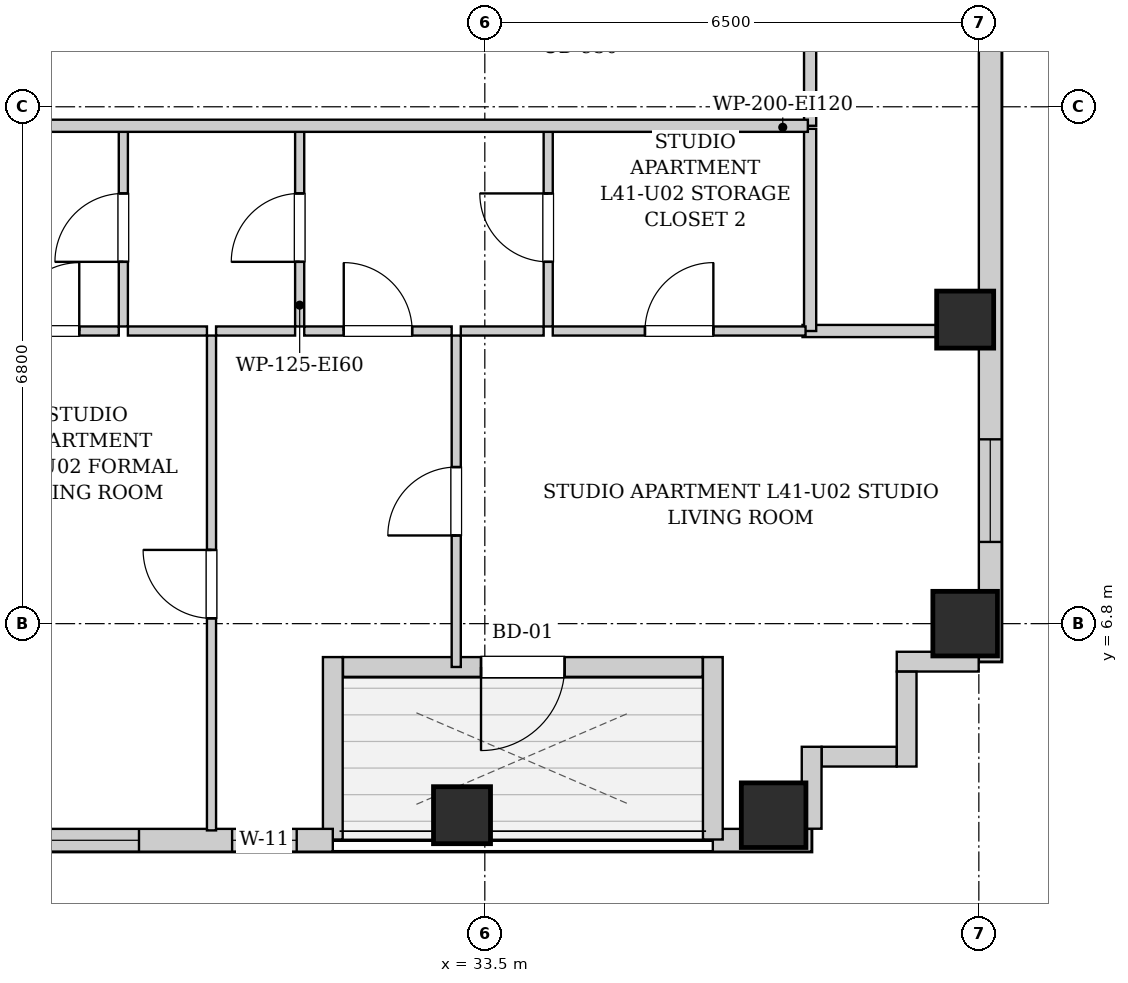
"""IFC4 building model, lengths in metres.
Left out: names, types, materials, properties, quantities, classifications, styles, units other than length and angle.
Written with IfcOpenShell. Run it as: python <this file> out.ifc"""

import sys

from ifc_helpers import new_model, si_unit, direction, frame, frame_2d, origin, origin_2d, place, context, subcontext, project, spatial, rectangle, extrude, element, fill, save


model = new_model("IFC4")
c1 = context("Model", 3, precision=1e-05, world=origin(), true_north=direction((0.0, 1.0)))
c2 = subcontext(c1, "Body", "Model", "MODEL_VIEW")
j1 = project(units=[si_unit("LENGTHUNIT", "METRE"), si_unit("PLANEANGLEUNIT", "RADIAN")], contexts=[c1])
p1 = place(None, origin())
s1 = spatial("IfcSite", under=j1, at=p1, CompositionType="ELEMENT")
p2 = place(p1, origin())
s2 = spatial("IfcBuilding", under=s1, at=p2, CompositionType="ELEMENT")
p3 = place(p2, frame((0.0, 0.0, 143.9)))
s3 = spatial("IfcBuildingStorey", under=s2, at=p3, CompositionType="ELEMENT", Elevation=143.9)
p4 = place(p3, frame((33.2, 4.28, 0.0), z_axis=(0.0, 0.0, 1.0), x_axis=(1.0, 0.0, 0.0)))
e1 = element("IfcColumn", 1, at=p4, inside=s3, PredefinedType="COLUMN", context=c2, shape_type="SweptSolid", body=[
    extrude(rectangle(XDim=0.75, YDim=0.75, at=origin_2d()), origin(), (0.0, 0.0, 1.0), 3.25),
])
for number, where, z_axis, x_axis in (
    (2, (37.3, 4.28, 0.0), (0.0, 0.0, 1.0), (1.0, 0.0, 0.0)),
    (3, (39.82, 6.8, 0.0), (0.0, 0.0, 1.0), (1.0, 0.0, 0.0)),
):
    element("IfcColumn", number, at=place(p3, frame(where, z_axis=z_axis, x_axis=x_axis)), inside=s3, PredefinedType="COLUMN", context=c2, shape_type="SweptSolid", body=[
        extrude(rectangle(XDim=0.85, YDim=0.85, at=origin_2d()), origin(), (0.0, 0.0, 1.0), 3.25),
    ])
p5 = place(p3, frame((39.82, 10.8, 0.0), z_axis=(0.0, 0.0, 1.0), x_axis=(1.0, 0.0, 0.0)))
e4 = element("IfcColumn", 4, at=p5, inside=s3, PredefinedType="COLUMN", context=c2, shape_type="SweptSolid", body=[
    extrude(rectangle(XDim=0.75, YDim=0.75, at=origin_2d()), origin(), (0.0, 0.0, 1.0), 3.25),
])
p6 = place(p3, frame((40.15, 40.8, 0.0), z_axis=(0.0, 0.0, 1.0), x_axis=(0.0, -1.0, 0.0)))
e5 = element("IfcWall", 5, at=p6, inside=s3, PredefinedType="SOLIDWALL", context=c2, shape_type="SweptSolid", body=[
    extrude(rectangle(XDim=34.5, YDim=0.3, at=frame_2d((17.25, 0.0))), origin(), (0.0, 0.0, 1.0), 2.99),
])
p7 = place(p6, frame((31.575, 0.0, 0.55)))
e6 = element("IfcOpeningElement", 6, at=p7, cuts=e5, PredefinedType="OPENING", context=c2, shape_type="SweptSolid", body=[
    extrude(rectangle(XDim=1.35, YDim=1.2, at=frame_2d((0.675, 0.6))), frame((0.0, 0.16, 0.0), z_axis=(0.0, -1.0, 0.0), x_axis=(1.0, 0.0, 0.0)), (0.0, 0.0, 1.0), 0.32),
])
p8 = place(p6, frame((3.075, 0.0, 0.55)))
e7 = element("IfcOpeningElement", 7, at=p8, cuts=e5, PredefinedType="OPENING", context=c2, shape_type="SweptSolid", body=[
    extrude(rectangle(XDim=1.35, YDim=1.2, at=frame_2d((0.675, 0.6))), frame((0.0, 0.16, 0.0), z_axis=(0.0, -1.0, 0.0), x_axis=(1.0, 0.0, 0.0)), (0.0, 0.0, 1.0), 0.32),
])
p9 = place(p6, frame((1.085, 0.0, 0.55)))
e8 = element("IfcOpeningElement", 8, at=p9, cuts=e5, PredefinedType="OPENING", context=c2, shape_type="SweptSolid", body=[
    extrude(rectangle(XDim=1.35, YDim=1.2, at=frame_2d((0.675, 0.6))), frame((0.0, 0.16, 0.0), z_axis=(0.0, -1.0, 0.0), x_axis=(1.0, 0.0, 0.0)), (0.0, 0.0, 1.0), 0.32),
])
p10 = place(p6, frame((22.8, 0.0, 0.55)))
e9 = element("IfcOpeningElement", 9, at=p10, cuts=e5, PredefinedType="OPENING", context=c2, shape_type="SweptSolid", body=[
    extrude(rectangle(XDim=1.35, YDim=1.2, at=frame_2d((0.675, 0.6))), frame((0.0, 0.16, 0.0), z_axis=(0.0, -1.0, 0.0), x_axis=(1.0, 0.0, 0.0)), (0.0, 0.0, 1.0), 0.32),
])
p11 = place(p6, frame((13.425, 0.0, 0.55)))
e10 = element("IfcOpeningElement", 10, at=p11, cuts=e5, PredefinedType="OPENING", context=c2, shape_type="SweptSolid", body=[
    extrude(rectangle(XDim=1.35, YDim=1.2, at=frame_2d((0.675, 0.6))), frame((0.0, 0.16, 0.0), z_axis=(0.0, -1.0, 0.0), x_axis=(1.0, 0.0, 0.0)), (0.0, 0.0, 1.0), 0.32),
])
p12 = place(p3, frame((37.8, 3.95, 0.0), z_axis=(0.0, 0.0, 1.0), x_axis=(-1.0, 0.0, 0.0)))
e11 = element("IfcWall", 11, at=p12, inside=s3, PredefinedType="SOLIDWALL", context=c2, shape_type="SweptSolid", body=[
    extrude(rectangle(XDim=1.3, YDim=0.3, at=frame_2d((0.65, 0.0))), origin(), (0.0, 0.0, 1.0), 2.99),
])
p13 = place(p3, frame((36.5, 3.96, 0.0), z_axis=(0.0, 0.0, 1.0), x_axis=(0.0, 1.0, 0.0)))
e12 = element("IfcWall", 12, at=p13, inside=s3, PredefinedType="SOLIDWALL", context=c2, shape_type="SweptSolid", body=[
    extrude(rectangle(XDim=2.4, YDim=0.26, at=frame_2d((1.2, 0.0))), origin(), (0.0, 0.0, 1.0), 2.99),
])
p14 = place(p3, frame((36.366, 6.23, 0.0), z_axis=(0.0, 0.0, 1.0), x_axis=(-1.0, 0.0, 0.0)))
e13 = element("IfcWall", 13, at=p14, inside=s3, PredefinedType="SOLIDWALL", context=c2, shape_type="SweptSolid", body=[
    extrude(rectangle(XDim=4.732, YDim=0.26, at=frame_2d((2.366, 0.0))), origin(), (0.0, 0.0, 1.0), 2.99),
])
p15 = place(p14, frame((1.816, 0.0, 0.0)))
e14 = element("IfcOpeningElement", 14, at=p15, cuts=e13, PredefinedType="OPENING", context=c2, shape_type="SweptSolid", body=[
    extrude(rectangle(XDim=1.1, YDim=2.0, at=frame_2d((0.55, 1.0))), frame((0.0, 0.14, 0.0), z_axis=(0.0, -1.0, 0.0), x_axis=(1.0, 0.0, 0.0)), (0.0, 0.0, 1.0), 0.28),
])
p16 = place(p3, frame((31.5, 6.36, 0.0), z_axis=(0.0, 0.0, 1.0), x_axis=(0.0, -1.0, 0.0)))
e15 = element("IfcWall", 15, at=p16, inside=s3, PredefinedType="SOLIDWALL", context=c2, shape_type="SweptSolid", body=[
    extrude(rectangle(XDim=2.4, YDim=0.26, at=frame_2d((1.2, 0.0))), origin(), (0.0, 0.0, 1.0), 2.99),
])
p17 = place(p3, frame((31.5, 3.95, 0.0), z_axis=(0.0, 0.0, 1.0), x_axis=(-1.0, 0.0, 0.0)))
e16 = element("IfcWall", 16, at=p17, inside=s3, PredefinedType="SOLIDWALL", context=c2, shape_type="SweptSolid", body=[
    extrude(rectangle(XDim=13.2, YDim=0.3, at=frame_2d((6.6, 0.0))), origin(), (0.0, 0.0, 1.0), 2.99),
])
p18 = place(p17, frame((11.476, 0.0, 0.55)))
e17 = element("IfcOpeningElement", 17, at=p18, cuts=e16, PredefinedType="OPENING", context=c2, shape_type="SweptSolid", body=[
    extrude(rectangle(XDim=1.35, YDim=1.2, at=frame_2d((0.675, 0.6))), frame((0.0, 0.16, 0.0), z_axis=(0.0, -1.0, 0.0), x_axis=(1.0, 0.0, 0.0)), (0.0, 0.0, 1.0), 0.32),
])
p19 = place(p17, frame((9.0, 0.0, 0.55)))
e18 = element("IfcOpeningElement", 18, at=p19, cuts=e16, PredefinedType="OPENING", context=c2, shape_type="SweptSolid", body=[
    extrude(rectangle(XDim=1.35, YDim=1.2, at=frame_2d((0.675, 0.6))), frame((0.0, 0.16, 0.0), z_axis=(0.0, -1.0, 0.0), x_axis=(1.0, 0.0, 0.0)), (0.0, 0.0, 1.0), 0.32),
])
p20 = place(p17, frame((2.55, 0.0, 0.55)))
e19 = element("IfcOpeningElement", 19, at=p20, cuts=e16, PredefinedType="OPENING", context=c2, shape_type="SweptSolid", body=[
    extrude(rectangle(XDim=1.35, YDim=1.2, at=frame_2d((0.675, 0.6))), frame((0.0, 0.16, 0.0), z_axis=(0.0, -1.0, 0.0), x_axis=(1.0, 0.0, 0.0)), (0.0, 0.0, 1.0), 0.32),
])
p21 = place(p17, frame((0.475, 0.0, 0.55)))
e20 = element("IfcOpeningElement", 20, at=p21, cuts=e16, PredefinedType="OPENING", context=c2, shape_type="SweptSolid", body=[
    extrude(rectangle(XDim=0.85, YDim=1.2, at=frame_2d((0.425, 0.6))), frame((0.0, 0.16, 0.0), z_axis=(0.0, -1.0, 0.0), x_axis=(1.0, 0.0, 0.0)), (0.0, 0.0, 1.0), 0.32),
])
p22 = place(p3, frame((39.998, 6.3, 0.0), z_axis=(0.0, 0.0, 1.0), x_axis=(-1.0, 0.0, 0.0)))
e21 = element("IfcWall", 21, at=p22, inside=s3, PredefinedType="SOLIDWALL", context=c2, shape_type="SweptSolid", body=[
    extrude(rectangle(XDim=1.078, YDim=0.26, at=frame_2d((0.539, 0.0))), origin(), (0.0, 0.0, 1.0), 2.99),
])
p23 = place(p3, frame((39.05, 6.168, 0.0), z_axis=(0.0, 0.0, 1.0), x_axis=(0.0, -1.0, 0.0)))
e22 = element("IfcWall", 22, at=p23, inside=s3, PredefinedType="SOLIDWALL", context=c2, shape_type="SweptSolid", body=[
    extrude(rectangle(XDim=1.248, YDim=0.26, at=frame_2d((0.624, 0.0))), origin(), (0.0, 0.0, 1.0), 2.99),
])
p24 = place(p3, frame((38.918, 5.05, 0.0), z_axis=(0.0, 0.0, 1.0), x_axis=(-1.0, 0.0, 0.0)))
e23 = element("IfcWall", 23, at=p24, inside=s3, PredefinedType="SOLIDWALL", context=c2, shape_type="SweptSolid", body=[
    extrude(rectangle(XDim=0.986, YDim=0.26, at=frame_2d((0.493, 0.0))), origin(), (0.0, 0.0, 1.0), 2.99),
])
p25 = place(p3, frame((37.8, 5.18, 0.0), z_axis=(0.0, 0.0, 1.0), x_axis=(0.0, -1.0, 0.0)))
e24 = element("IfcWall", 24, at=p25, inside=s3, PredefinedType="SOLIDWALL", context=c2, shape_type="SweptSolid", body=[
    extrude(rectangle(XDim=1.078, YDim=0.26, at=frame_2d((0.539, 0.0))), origin(), (0.0, 0.0, 1.0), 2.99),
])
p26 = place(p3, frame((37.78, 13.35, 0.0), z_axis=(0.0, 0.0, 1.0), x_axis=(0.0, 1.0, 0.0)))
e25 = element("IfcWall", 25, at=p26, inside=s3, PredefinedType="PARTITIONING", context=c2, shape_type="SweptSolid", body=[
    extrude(rectangle(XDim=1.74, YDim=0.16, at=frame_2d((0.87, 0.0))), origin(), (0.0, 0.0, 1.0), 2.99),
])
p27 = place(p3, frame((37.68, 10.65, 0.0), z_axis=(0.0, 0.0, 1.0), x_axis=(1.0, 0.0, 0.0)))
e26 = element("IfcWall", 26, at=p27, inside=s3, PredefinedType="PARTITIONING", context=c2, shape_type="SweptSolid", body=[
    extrude(rectangle(XDim=2.34, YDim=0.16, at=frame_2d((1.17, 0.0))), origin(), (0.0, 0.0, 1.0), 2.99),
])
p28 = place(p3, frame((37.78, 10.65, 0.0), z_axis=(0.0, 0.0, 1.0), x_axis=(0.0, 1.0, 0.0)))
e27 = element("IfcWall", 27, at=p28, inside=s3, PredefinedType="PARTITIONING", context=c2, shape_type="SweptSolid", body=[
    extrude(rectangle(XDim=2.66, YDim=0.16, at=frame_2d((1.33, 0.0))), origin(), (0.0, 0.0, 1.0), 2.99),
])
p29 = place(p3, frame((28.744, 10.71, 0.0), z_axis=(0.0, 0.0, 1.0), x_axis=(0.0, 1.0, 0.0)))
e28 = element("IfcWall", 28, at=p29, inside=s3, PredefinedType="PARTITIONING", context=c2, shape_type="SweptSolid", body=[
    extrude(rectangle(XDim=2.6, YDim=0.12, at=frame_2d((1.3, 0.0))), origin(), (0.0, 0.0, 1.0), 2.99),
])
p30 = place(p29, frame((0.85, 0.0, 0.0)))
e29 = element("IfcOpeningElement", 29, at=p30, cuts=e28, PredefinedType="OPENING", context=c2, shape_type="SweptSolid", body=[
    extrude(rectangle(XDim=0.9, YDim=2.05, at=frame_2d((0.45, 1.025))), frame((0.0, 0.07, 0.0), z_axis=(0.0, -1.0, 0.0), x_axis=(1.0, 0.0, 0.0)), (0.0, 0.0, 1.0), 0.14),
])
p31 = place(p3, frame((26.744, 10.65, 0.0), z_axis=(0.0, 0.0, 1.0), x_axis=(1.0, 0.0, 0.0)))
e30 = element("IfcWall", 30, at=p31, inside=s3, PredefinedType="PARTITIONING", context=c2, shape_type="SweptSolid", body=[
    extrude(rectangle(XDim=1.94, YDim=0.12, at=frame_2d((0.97, 0.0))), origin(), (0.0, 0.0, 1.0), 2.99),
])
p32 = place(p31, frame((0.52, 0.0, 0.0)))
e31 = element("IfcOpeningElement", 31, at=p32, cuts=e30, PredefinedType="OPENING", context=c2, shape_type="SweptSolid", body=[
    extrude(rectangle(XDim=0.9, YDim=2.05, at=frame_2d((0.45, 1.025))), frame((0.0, 0.07, 0.0), z_axis=(0.0, -1.0, 0.0), x_axis=(1.0, 0.0, 0.0)), (0.0, 0.0, 1.0), 0.14),
])
p33 = place(p3, frame((31.064, 10.71, 0.0), z_axis=(0.0, 0.0, 1.0), x_axis=(0.0, 1.0, 0.0)))
e32 = element("IfcWall", 32, at=p33, inside=s3, PredefinedType="PARTITIONING", context=c2, shape_type="SweptSolid", body=[
    extrude(rectangle(XDim=2.6, YDim=0.12, at=frame_2d((1.3, 0.0))), origin(), (0.0, 0.0, 1.0), 2.99),
])
p34 = place(p33, frame((0.85, 0.0, 0.0)))
e33 = element("IfcOpeningElement", 33, at=p34, cuts=e32, PredefinedType="OPENING", context=c2, shape_type="SweptSolid", body=[
    extrude(rectangle(XDim=0.9, YDim=2.05, at=frame_2d((0.45, 1.025))), frame((0.0, 0.07, 0.0), z_axis=(0.0, -1.0, 0.0), x_axis=(1.0, 0.0, 0.0)), (0.0, 0.0, 1.0), 0.14),
])
p35 = place(p3, frame((28.804, 10.65, 0.0), z_axis=(0.0, 0.0, 1.0), x_axis=(1.0, 0.0, 0.0)))
e34 = element("IfcWall", 34, at=p35, inside=s3, PredefinedType="PARTITIONING", context=c2, shape_type="SweptSolid", body=[
    extrude(rectangle(XDim=1.04, YDim=0.12, at=frame_2d((0.52, 0.0))), origin(), (0.0, 0.0, 1.0), 2.99),
])
p36 = place(p3, frame((29.964, 10.65, 0.0), z_axis=(0.0, 0.0, 1.0), x_axis=(1.0, 0.0, 0.0)))
e35 = element("IfcWall", 35, at=p36, inside=s3, PredefinedType="PARTITIONING", context=c2, shape_type="SweptSolid", body=[
    extrude(rectangle(XDim=1.04, YDim=0.12, at=frame_2d((0.52, 0.0))), origin(), (0.0, 0.0, 1.0), 2.99),
])
p37 = place(p3, frame((34.334, 10.71, 0.0), z_axis=(0.0, 0.0, 1.0), x_axis=(0.0, 1.0, 0.0)))
e36 = element("IfcWall", 36, at=p37, inside=s3, PredefinedType="PARTITIONING", context=c2, shape_type="SweptSolid", body=[
    extrude(rectangle(XDim=2.6, YDim=0.12, at=frame_2d((1.3, 0.0))), origin(), (0.0, 0.0, 1.0), 2.99),
])
p38 = place(p37, frame((0.85, 0.0, 0.0)))
e37 = element("IfcOpeningElement", 37, at=p38, cuts=e36, PredefinedType="OPENING", context=c2, shape_type="SweptSolid", body=[
    extrude(rectangle(XDim=0.9, YDim=2.05, at=frame_2d((0.45, 1.025))), frame((0.0, 0.07, 0.0), z_axis=(0.0, -1.0, 0.0), x_axis=(1.0, 0.0, 0.0)), (0.0, 0.0, 1.0), 0.14),
])
p39 = place(p3, frame((31.124, 10.65, 0.0), z_axis=(0.0, 0.0, 1.0), x_axis=(1.0, 0.0, 0.0)))
e38 = element("IfcWall", 38, at=p39, inside=s3, PredefinedType="PARTITIONING", context=c2, shape_type="SweptSolid", body=[
    extrude(rectangle(XDim=1.94, YDim=0.12, at=frame_2d((0.97, 0.0))), origin(), (0.0, 0.0, 1.0), 2.99),
])
p40 = place(p39, frame((0.52, 0.0, 0.0)))
e39 = element("IfcOpeningElement", 39, at=p40, cuts=e38, PredefinedType="OPENING", context=c2, shape_type="SweptSolid", body=[
    extrude(rectangle(XDim=0.9, YDim=2.05, at=frame_2d((0.45, 1.025))), frame((0.0, 0.07, 0.0), z_axis=(0.0, -1.0, 0.0), x_axis=(1.0, 0.0, 0.0)), (0.0, 0.0, 1.0), 0.14),
])
p41 = place(p3, frame((33.184, 10.65, 0.0), z_axis=(0.0, 0.0, 1.0), x_axis=(1.0, 0.0, 0.0)))
e40 = element("IfcWall", 40, at=p41, inside=s3, PredefinedType="PARTITIONING", context=c2, shape_type="SweptSolid", body=[
    extrude(rectangle(XDim=1.09, YDim=0.12, at=frame_2d((0.545, 0.0))), origin(), (0.0, 0.0, 1.0), 2.99),
])
p42 = place(p3, frame((34.394, 10.65, 0.0), z_axis=(0.0, 0.0, 1.0), x_axis=(1.0, 0.0, 0.0)))
e41 = element("IfcWall", 41, at=p42, inside=s3, PredefinedType="PARTITIONING", context=c2, shape_type="SweptSolid", body=[
    extrude(rectangle(XDim=3.326, YDim=0.12, at=frame_2d((1.663, 0.0))), origin(), (0.0, 0.0, 1.0), 2.99),
])
p43 = place(p42, frame((1.213, 0.0, 0.0)))
e42 = element("IfcOpeningElement", 42, at=p43, cuts=e41, PredefinedType="OPENING", context=c2, shape_type="SweptSolid", body=[
    extrude(rectangle(XDim=0.9, YDim=2.05, at=frame_2d((0.45, 1.025))), frame((0.0, 0.07, 0.0), z_axis=(0.0, -1.0, 0.0), x_axis=(1.0, 0.0, 0.0)), (0.0, 0.0, 1.0), 0.14),
])
p44 = place(p3, frame((29.904, 4.08, 0.0), z_axis=(0.0, 0.0, 1.0), x_axis=(0.0, 1.0, 0.0)))
e43 = element("IfcWall", 43, at=p44, inside=s3, PredefinedType="PARTITIONING", context=c2, shape_type="SweptSolid", body=[
    extrude(rectangle(XDim=6.51, YDim=0.12, at=frame_2d((3.255, 0.0))), origin(), (0.0, 0.0, 1.0), 2.99),
])
p45 = place(p44, frame((2.79, 0.0, 0.0)))
e44 = element("IfcOpeningElement", 44, at=p45, cuts=e43, PredefinedType="OPENING", context=c2, shape_type="SweptSolid", body=[
    extrude(rectangle(XDim=0.9, YDim=2.05, at=frame_2d((0.45, 1.025))), frame((0.0, 0.07, 0.0), z_axis=(0.0, -1.0, 0.0), x_axis=(1.0, 0.0, 0.0)), (0.0, 0.0, 1.0), 0.14),
])
p46 = place(p3, frame((33.124, 6.23, 0.0), z_axis=(0.0, 0.0, 1.0), x_axis=(0.0, 1.0, 0.0)))
e45 = element("IfcWall", 45, at=p46, inside=s3, PredefinedType="PARTITIONING", context=c2, shape_type="SweptSolid", body=[
    extrude(rectangle(XDim=4.36, YDim=0.12, at=frame_2d((2.18, 0.0))), origin(), (0.0, 0.0, 1.0), 2.426),
])
p47 = place(p46, frame((1.73, 0.0, 0.0)))
e46 = element("IfcOpeningElement", 46, at=p47, cuts=e45, PredefinedType="OPENING", context=c2, shape_type="SweptSolid", body=[
    extrude(rectangle(XDim=0.9, YDim=2.05, at=frame_2d((0.45, 1.025))), frame((0.0, 0.07, 0.0), z_axis=(0.0, -1.0, 0.0), x_axis=(1.0, 0.0, 0.0)), (0.0, 0.0, 1.0), 0.14),
])
p48 = place(p3, frame((10.05, 13.35, 0.0), z_axis=(0.0, 0.0, 1.0), x_axis=(1.0, 0.0, 0.0)))
e47 = element("IfcWall", 47, at=p48, inside=s3, PredefinedType="PARTITIONING", context=c2, shape_type="SweptSolid", body=[
    extrude(rectangle(XDim=27.7, YDim=0.16, at=frame_2d((13.85, 0.0))), origin(), (0.0, 0.0, 1.0), 2.99),
])
p49 = place(p48, frame((4.063, 0.0, 0.0)))
e48 = element("IfcOpeningElement", 48, at=p49, cuts=e47, PredefinedType="OPENING", context=c2, shape_type="SweptSolid", body=[
    extrude(rectangle(XDim=0.95, YDim=2.1, at=frame_2d((0.475, 1.05))), frame((0.0, 0.09, 0.0), z_axis=(0.0, -1.0, 0.0), x_axis=(1.0, 0.0, 0.0)), (0.0, 0.0, 1.0), 0.18),
])
p50 = place(p48, frame((11.735, 0.0, 0.0)))
e49 = element("IfcOpeningElement", 49, at=p50, cuts=e47, PredefinedType="OPENING", context=c2, shape_type="SweptSolid", body=[
    extrude(rectangle(XDim=0.95, YDim=2.1, at=frame_2d((0.475, 1.05))), frame((0.0, 0.09, 0.0), z_axis=(0.0, -1.0, 0.0), x_axis=(1.0, 0.0, 0.0)), (0.0, 0.0, 1.0), 0.18),
])
p51 = place(p30, origin())
e50 = element("IfcDoor", 50, at=p51, inside=s3, OperationType="SINGLE_SWING_LEFT", PredefinedType="DOOR", context=c2, shape_type="SweptSolid", body=[
    extrude(rectangle(XDim=0.9, YDim=2.05, at=frame_2d((0.45, 1.025))), frame((0.0, 0.025, 0.0), z_axis=(0.0, -1.0, 0.0), x_axis=(1.0, 0.0, 0.0)), (0.0, 0.0, 1.0), 0.05),
])
fill(e29, e50)
p52 = place(p32, origin())
e51 = element("IfcDoor", 51, at=p52, inside=s3, OperationType="SINGLE_SWING_RIGHT", PredefinedType="DOOR", context=c2, shape_type="SweptSolid", body=[
    extrude(rectangle(XDim=0.9, YDim=2.05, at=frame_2d((0.45, 1.025))), frame((0.0, 0.025, 0.0), z_axis=(0.0, -1.0, 0.0), x_axis=(1.0, 0.0, 0.0)), (0.0, 0.0, 1.0), 0.05),
])
fill(e31, e51)
p53 = place(p34, origin())
e52 = element("IfcDoor", 52, at=p53, inside=s3, OperationType="SINGLE_SWING_LEFT", PredefinedType="DOOR", context=c2, shape_type="SweptSolid", body=[
    extrude(rectangle(XDim=0.9, YDim=2.05, at=frame_2d((0.45, 1.025))), frame((0.0, 0.025, 0.0), z_axis=(0.0, -1.0, 0.0), x_axis=(1.0, 0.0, 0.0)), (0.0, 0.0, 1.0), 0.05),
])
fill(e33, e52)
p54 = place(p38, origin())
e53 = element("IfcDoor", 53, at=p54, inside=s3, OperationType="SINGLE_SWING_RIGHT", PredefinedType="DOOR", context=c2, shape_type="SweptSolid", body=[
    extrude(rectangle(XDim=0.9, YDim=2.05, at=frame_2d((0.45, 1.025))), frame((0.0, 0.025, 0.0), z_axis=(0.0, -1.0, 0.0), x_axis=(1.0, 0.0, 0.0)), (0.0, 0.0, 1.0), 0.05),
])
fill(e37, e53)
p55 = place(p40, origin())
e54 = element("IfcDoor", 54, at=p55, inside=s3, OperationType="SINGLE_SWING_LEFT", PredefinedType="DOOR", context=c2, shape_type="SweptSolid", body=[
    extrude(rectangle(XDim=0.9, YDim=2.05, at=frame_2d((0.45, 1.025))), frame((0.0, 0.025, 0.0), z_axis=(0.0, -1.0, 0.0), x_axis=(1.0, 0.0, 0.0)), (0.0, 0.0, 1.0), 0.05),
])
fill(e39, e54)
p56 = place(p43, origin())
e55 = element("IfcDoor", 55, at=p56, inside=s3, OperationType="SINGLE_SWING_RIGHT", PredefinedType="DOOR", context=c2, shape_type="SweptSolid", body=[
    extrude(rectangle(XDim=0.9, YDim=2.05, at=frame_2d((0.45, 1.025))), frame((0.0, 0.025, 0.0), z_axis=(0.0, -1.0, 0.0), x_axis=(1.0, 0.0, 0.0)), (0.0, 0.0, 1.0), 0.05),
])
fill(e42, e55)
p57 = place(p45, origin())
e56 = element("IfcDoor", 56, at=p57, inside=s3, OperationType="SINGLE_SWING_RIGHT", PredefinedType="DOOR", context=c2, shape_type="SweptSolid", body=[
    extrude(rectangle(XDim=0.9, YDim=2.05, at=frame_2d((0.45, 1.025))), frame((0.0, 0.025, 0.0), z_axis=(0.0, -1.0, 0.0), x_axis=(1.0, 0.0, 0.0)), (0.0, 0.0, 1.0), 0.05),
])
fill(e44, e56)
p58 = place(p47, origin())
e57 = element("IfcDoor", 57, at=p58, inside=s3, OperationType="SINGLE_SWING_LEFT", PredefinedType="DOOR", context=c2, shape_type="SweptSolid", body=[
    extrude(rectangle(XDim=0.9, YDim=2.05, at=frame_2d((0.45, 1.025))), frame((0.0, 0.025, 0.0), z_axis=(0.0, -1.0, 0.0), x_axis=(1.0, 0.0, 0.0)), (0.0, 0.0, 1.0), 0.05),
])
fill(e46, e57)
p59 = place(p15, origin())
e58 = element("IfcDoor", 58, at=p59, inside=s3, OperationType="SINGLE_SWING_RIGHT", PredefinedType="DOOR", context=c2, shape_type="SweptSolid", body=[
    extrude(rectangle(XDim=1.1, YDim=2.0, at=frame_2d((0.55, 1.0))), frame((0.0, 0.025, 0.0), z_axis=(0.0, -1.0, 0.0), x_axis=(1.0, 0.0, 0.0)), (0.0, 0.0, 1.0), 0.05),
])
fill(e14, e58)
p60 = place(p20, origin())
e59 = element("IfcWindow", 59, at=p60, inside=s3, PartitioningType="SINGLE_PANEL", PredefinedType="WINDOW", context=c2, shape_type="SweptSolid", body=[
    extrude(rectangle(XDim=1.35, YDim=1.2, at=frame_2d((0.675, 0.6))), frame((0.0, 0.03, 0.0), z_axis=(0.0, -1.0, 0.0), x_axis=(1.0, 0.0, 0.0)), (0.0, 0.0, 1.0), 0.06),
])
fill(e19, e59)
p61 = place(p21, origin())
e60 = element("IfcWindow", 60, at=p61, inside=s3, PartitioningType="SINGLE_PANEL", PredefinedType="WINDOW", context=c2, shape_type="SweptSolid", body=[
    extrude(rectangle(XDim=0.85, YDim=1.2, at=frame_2d((0.425, 0.6))), frame((0.0, 0.03, 0.0), z_axis=(0.0, -1.0, 0.0), x_axis=(1.0, 0.0, 0.0)), (0.0, 0.0, 1.0), 0.06),
])
fill(e20, e60)
p62 = place(p7, origin())
e61 = element("IfcWindow", 61, at=p62, inside=s3, PartitioningType="SINGLE_PANEL", PredefinedType="WINDOW", context=c2, shape_type="SweptSolid", body=[
    extrude(rectangle(XDim=1.35, YDim=1.2, at=frame_2d((0.675, 0.6))), frame((0.0, 0.03, 0.0), z_axis=(0.0, -1.0, 0.0), x_axis=(1.0, 0.0, 0.0)), (0.0, 0.0, 1.0), 0.06),
])
fill(e6, e61)
save(model, sys.argv[1])
